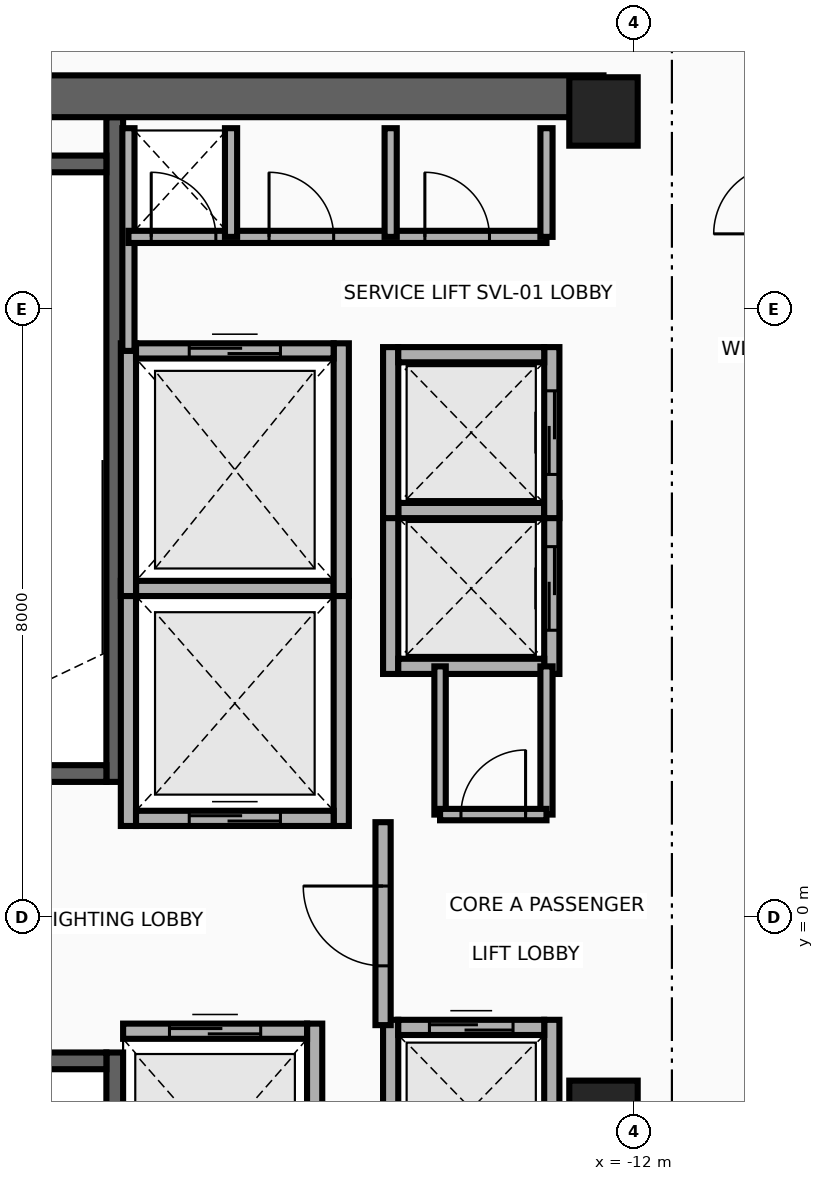
"""IFC4 building model, lengths in metres.
Left out: names, types, materials, properties, quantities, classifications, styles, units other than length and angle.
Written with IfcOpenShell. Run it as: python <this file> out.ifc"""

import sys

from ifc_helpers import new_model, si_unit, direction, frame, frame_2d, origin, origin_2d, place, context, subcontext, project, spatial, rectangle, extrude, source, transform, mapped, element, fill, save


model = new_model("IFC4")
c1 = context("Model", 3, precision=1e-05, world=origin(), true_north=direction((0.0, 1.0)))
c2 = subcontext(c1, "Body", "Model", "MODEL_VIEW")
j1 = project(units=[si_unit("LENGTHUNIT", "METRE"), si_unit("PLANEANGLEUNIT", "RADIAN")], contexts=[c1])
p1 = place(None, origin())
s1 = spatial("IfcSite", under=j1, at=p1, CompositionType="ELEMENT")
p2 = place(p1, origin())
s2 = spatial("IfcBuilding", under=s1, at=p2, CompositionType="ELEMENT")
p3 = place(p2, frame((0.0, 0.0, 237.0)))
s3 = spatial("IfcBuildingStorey", under=s2, at=p3, CompositionType="ELEMENT", Elevation=237.0)
p4 = place(p3, frame((-18.83, 1.78, 0.0), z_axis=(0.0, 0.0, 1.0), x_axis=(0.0, 1.0, 0.0)))
e1 = element("IfcWall", 1, at=p4, inside=s3, PredefinedType="SHEAR", context=c2, shape_type="SweptSolid", body=[
    extrude(rectangle(XDim=8.745, YDim=0.22, at=frame_2d((4.373, 0.0))), origin(), (0.0, 0.0, 1.0), 3.26),
])
p5 = place(p3, frame((-22.05, 1.89, 0.0), z_axis=(0.0, 0.0, 1.0), x_axis=(1.0, 0.0, 0.0)))
e2 = element("IfcWall", 2, at=p5, inside=s3, PredefinedType="SHEAR", context=c2, shape_type="SweptSolid", body=[
    extrude(rectangle(XDim=3.11, YDim=0.22, at=frame_2d((1.555, 0.0))), origin(), (0.0, 0.0, 1.0), 3.26),
])
p6 = place(p5, frame((1.0, 0.0, 0.0)))
e3 = element("IfcOpeningElement", 3, at=p6, cuts=e2, PredefinedType="OPENING", context=c2, shape_type="SweptSolid", body=[
    extrude(rectangle(XDim=1.1, YDim=2.15, at=frame_2d((0.55, 1.075))), frame((0.0, 0.125, 0.0), z_axis=(0.0, -1.0, 0.0), x_axis=(1.0, 0.0, 0.0)), (0.0, 0.0, 1.0), 0.25),
])
p7 = place(p3, frame((-22.05, 9.91, 0.0), z_axis=(0.0, 0.0, 1.0), x_axis=(1.0, 0.0, 0.0)))
e4 = element("IfcWall", 4, at=p7, inside=s3, PredefinedType="SHEAR", context=c2, shape_type="SweptSolid", body=[
    extrude(rectangle(XDim=3.11, YDim=0.22, at=frame_2d((1.555, 0.0))), origin(), (0.0, 0.0, 1.0), 3.26),
])
p8 = place(p3, frame((-18.83, -10.525, 0.0), z_axis=(0.0, 0.0, 1.0), x_axis=(0.0, 1.0, 0.0)))
e5 = element("IfcWall", 5, at=p8, inside=s3, PredefinedType="SHEAR", context=c2, shape_type="SweptSolid", body=[
    extrude(rectangle(XDim=8.745, YDim=0.22, at=frame_2d((4.373, 0.0))), origin(), (0.0, 0.0, 1.0), 3.26),
])
p9 = place(p3, frame((-22.05, -1.89, 0.0), z_axis=(0.0, 0.0, 1.0), x_axis=(1.0, 0.0, 0.0)))
e6 = element("IfcWall", 6, at=p9, inside=s3, PredefinedType="SHEAR", context=c2, shape_type="SweptSolid", body=[
    extrude(rectangle(XDim=3.11, YDim=0.22, at=frame_2d((1.555, 0.0))), origin(), (0.0, 0.0, 1.0), 3.26),
])
p10 = place(p9, frame((1.0, 0.0, 0.0)))
e7 = element("IfcOpeningElement", 7, at=p10, cuts=e6, PredefinedType="OPENING", context=c2, shape_type="SweptSolid", body=[
    extrude(rectangle(XDim=1.1, YDim=2.15, at=frame_2d((0.55, 1.075))), frame((0.0, 0.125, 0.0), z_axis=(0.0, -1.0, 0.0), x_axis=(1.0, 0.0, 0.0)), (0.0, 0.0, 1.0), 0.25),
])
p11 = place(p3, frame((-22.65, 10.8, 0.0), z_axis=(0.0, 0.0, 1.0), x_axis=(1.0, 0.0, 0.0)))
e8 = element("IfcWall", 8, at=p11, inside=s3, PredefinedType="SHEAR", context=c2, shape_type="SweptSolid", body=[
    extrude(rectangle(XDim=10.25, YDim=0.55, at=frame_2d((5.125, 0.0))), origin(), (0.0, 0.0, 1.0), 3.26),
])
m1 = source(origin(), c2, "Body", "SweptSolid", [
    extrude(rectangle(XDim=0.9, YDim=0.9, at=origin_2d()), origin(), (0.0, 0.0, 1.0), 3.5),
])
for number, where, z_axis, x_axis in (
    (9, (-12.4, -2.6, 0.0), (0.0, 0.0, 1.0), (1.0, 0.0, 0.0)),
    (10, (-12.4, 10.6, 0.0), (0.0, 0.0, 1.0), (1.0, 0.0, 0.0)),
):
    element("IfcColumn", number, at=place(p3, frame(where, z_axis=z_axis, x_axis=x_axis)), inside=s3, PredefinedType="COLUMN", context=c2, shape_type="MappedRepresentation", body=[
        mapped(m1, transform((0.0, 0.0, 0.0), x_axis=(1.0, 0.0, 0.0), y_axis=(0.0, 1.0, 0.0), z_axis=(0.0, 0.0, 1.0), scale=1.0)),
    ])
for number, where, z_axis, x_axis in (
    (11, (-18.65, 1.2, 0.0), (0.0, 0.0, 1.0), (0.0, 1.0, 0.0)),
    (12, (-15.85, 1.2, 0.0), (0.0, 0.0, 1.0), (0.0, 1.0, 0.0)),
):
    element("IfcWall", number, at=place(p3, frame(where, z_axis=z_axis, x_axis=x_axis)), inside=s3, PredefinedType="MOVABLE", context=c2, shape_type="SweptSolid", body=[
        extrude(rectangle(XDim=3.225, YDim=0.2, at=frame_2d((1.613, 0.0))), origin(), (0.0, 0.0, 1.0), 3.26),
    ])
p12 = place(p3, frame((-18.55, 1.3, 0.0), z_axis=(0.0, 0.0, 1.0), x_axis=(1.0, 0.0, 0.0)))
e13 = element("IfcWall", 13, at=p12, inside=s3, PredefinedType="MOVABLE", context=c2, shape_type="SweptSolid", body=[
    extrude(rectangle(XDim=2.6, YDim=0.2, at=frame_2d((1.3, 0.0))), origin(), (0.0, 0.0, 1.0), 3.26),
])
p13 = place(p12, frame((0.7, 0.0, 0.0)))
e14 = element("IfcOpeningElement", 14, at=p13, cuts=e13, PredefinedType="OPENING", context=c2, shape_type="SweptSolid", body=[
    extrude(rectangle(XDim=1.2, YDim=2.1, at=frame_2d((0.6, 1.05))), frame((0.0, 0.115, 0.0), z_axis=(0.0, -1.0, 0.0), x_axis=(1.0, 0.0, 0.0)), (0.0, 0.0, 1.0), 0.23),
])
p14 = place(p3, frame((-18.55, 4.325, 0.0), z_axis=(0.0, 0.0, 1.0), x_axis=(1.0, 0.0, 0.0)))
e15 = element("IfcWall", 15, at=p14, inside=s3, PredefinedType="MOVABLE", context=c2, shape_type="SweptSolid", body=[
    extrude(rectangle(XDim=2.6, YDim=0.2, at=frame_2d((1.3, 0.0))), origin(), (0.0, 0.0, 1.0), 3.26),
])
p15 = place(p3, frame((-16.2, -4.6, 0.0), z_axis=(0.0, 0.0, 1.0), x_axis=(0.0, 1.0, 0.0)))
e16 = element("IfcWall", 16, at=p15, inside=s3, PredefinedType="MOVABLE", context=c2, shape_type="SweptSolid", body=[
    extrude(rectangle(XDim=3.2, YDim=0.2, at=frame_2d((1.6, 0.0))), origin(), (0.0, 0.0, 1.0), 3.26),
])
p16 = place(p3, frame((-18.72, -1.5, 0.0), z_axis=(0.0, 0.0, 1.0), x_axis=(1.0, 0.0, 0.0)))
e17 = element("IfcWall", 17, at=p16, inside=s3, PredefinedType="MOVABLE", context=c2, shape_type="SweptSolid", body=[
    extrude(rectangle(XDim=2.42, YDim=0.2, at=frame_2d((1.21, 0.0))), origin(), (0.0, 0.0, 1.0), 3.26),
])
p17 = place(p16, frame((0.61, 0.0, 0.0)))
e18 = element("IfcOpeningElement", 18, at=p17, cuts=e17, PredefinedType="OPENING", context=c2, shape_type="SweptSolid", body=[
    extrude(rectangle(XDim=1.2, YDim=2.1, at=frame_2d((0.6, 1.05))), frame((0.0, 0.115, 0.0), z_axis=(0.0, -1.0, 0.0), x_axis=(1.0, 0.0, 0.0)), (0.0, 0.0, 1.0), 0.23),
])
for number, where, z_axis, x_axis in (
    (19, (-18.65, 4.225, 0.0), (0.0, 0.0, 1.0), (0.0, 1.0, 0.0)),
    (20, (-15.85, 4.225, 0.0), (0.0, 0.0, 1.0), (0.0, 1.0, 0.0)),
):
    element("IfcWall", number, at=place(p3, frame(where, z_axis=z_axis, x_axis=x_axis)), inside=s3, PredefinedType="MOVABLE", context=c2, shape_type="SweptSolid", body=[
        extrude(rectangle(XDim=3.325, YDim=0.2, at=frame_2d((1.663, 0.0))), origin(), (0.0, 0.0, 1.0), 3.26),
    ])
p18 = place(p3, frame((-18.55, 7.45, 0.0), z_axis=(0.0, 0.0, 1.0), x_axis=(1.0, 0.0, 0.0)))
e21 = element("IfcWall", 21, at=p18, inside=s3, PredefinedType="MOVABLE", context=c2, shape_type="SweptSolid", body=[
    extrude(rectangle(XDim=2.6, YDim=0.2, at=frame_2d((1.3, 0.0))), origin(), (0.0, 0.0, 1.0), 3.26),
])
p19 = place(p18, frame((0.7, 0.0, 0.0)))
e22 = element("IfcOpeningElement", 22, at=p19, cuts=e21, PredefinedType="OPENING", context=c2, shape_type="SweptSolid", body=[
    extrude(rectangle(XDim=1.2, YDim=2.1, at=frame_2d((0.6, 1.05))), frame((0.0, 0.115, 0.0), z_axis=(0.0, -1.0, 0.0), x_axis=(1.0, 0.0, 0.0)), (0.0, 0.0, 1.0), 0.23),
])
p20 = place(p3, frame((-15.2, 3.2, 0.0), z_axis=(0.0, 0.0, 1.0), x_axis=(0.0, 1.0, 0.0)))
e23 = element("IfcWall", 23, at=p20, inside=s3, PredefinedType="MOVABLE", context=c2, shape_type="SweptSolid", body=[
    extrude(rectangle(XDim=2.25, YDim=0.2, at=frame_2d((1.125, 0.0))), origin(), (0.0, 0.0, 1.0), 3.26),
])
p21 = place(p3, frame((-13.08, 3.2, 0.0), z_axis=(0.0, 0.0, 1.0), x_axis=(0.0, 1.0, 0.0)))
e24 = element("IfcWall", 24, at=p21, inside=s3, PredefinedType="MOVABLE", context=c2, shape_type="SweptSolid", body=[
    extrude(rectangle(XDim=2.25, YDim=0.2, at=frame_2d((1.125, 0.0))), origin(), (0.0, 0.0, 1.0), 3.26),
])
p22 = place(p21, frame((0.575, 0.0, 0.0)))
e25 = element("IfcOpeningElement", 25, at=p22, cuts=e24, PredefinedType="OPENING", context=c2, shape_type="SweptSolid", body=[
    extrude(rectangle(XDim=1.1, YDim=2.1, at=frame_2d((0.55, 1.05))), frame((0.0, 0.115, 0.0), z_axis=(0.0, -1.0, 0.0), x_axis=(1.0, 0.0, 0.0)), (0.0, 0.0, 1.0), 0.23),
])
for number, where, z_axis, x_axis in (
    (26, (-15.1, 3.3, 0.0), (0.0, 0.0, 1.0), (1.0, 0.0, 0.0)),
    (27, (-15.1, 5.35, 0.0), (0.0, 0.0, 1.0), (1.0, 0.0, 0.0)),
):
    element("IfcWall", number, at=place(p3, frame(where, z_axis=z_axis, x_axis=x_axis)), inside=s3, PredefinedType="MOVABLE", context=c2, shape_type="SweptSolid", body=[
        extrude(rectangle(XDim=1.92, YDim=0.2, at=frame_2d((0.96, 0.0))), origin(), (0.0, 0.0, 1.0), 3.26),
    ])
p23 = place(p3, frame((-15.2, 5.25, 0.0), z_axis=(0.0, 0.0, 1.0), x_axis=(0.0, 1.0, 0.0)))
e28 = element("IfcWall", 28, at=p23, inside=s3, PredefinedType="MOVABLE", context=c2, shape_type="SweptSolid", body=[
    extrude(rectangle(XDim=2.25, YDim=0.2, at=frame_2d((1.125, 0.0))), origin(), (0.0, 0.0, 1.0), 3.26),
])
p24 = place(p3, frame((-13.08, 5.25, 0.0), z_axis=(0.0, 0.0, 1.0), x_axis=(0.0, 1.0, 0.0)))
e29 = element("IfcWall", 29, at=p24, inside=s3, PredefinedType="MOVABLE", context=c2, shape_type="SweptSolid", body=[
    extrude(rectangle(XDim=2.25, YDim=0.2, at=frame_2d((1.125, 0.0))), origin(), (0.0, 0.0, 1.0), 3.26),
])
p25 = place(p24, frame((0.575, 0.0, 0.0)))
e30 = element("IfcOpeningElement", 30, at=p25, cuts=e29, PredefinedType="OPENING", context=c2, shape_type="SweptSolid", body=[
    extrude(rectangle(XDim=1.1, YDim=2.1, at=frame_2d((0.55, 1.05))), frame((0.0, 0.115, 0.0), z_axis=(0.0, -1.0, 0.0), x_axis=(1.0, 0.0, 0.0)), (0.0, 0.0, 1.0), 0.23),
])
p26 = place(p3, frame((-15.1, 7.4, 0.0), z_axis=(0.0, 0.0, 1.0), x_axis=(1.0, 0.0, 0.0)))
e31 = element("IfcWall", 31, at=p26, inside=s3, PredefinedType="MOVABLE", context=c2, shape_type="SweptSolid", body=[
    extrude(rectangle(XDim=1.92, YDim=0.2, at=frame_2d((0.96, 0.0))), origin(), (0.0, 0.0, 1.0), 3.26),
])
for number, where, z_axis, x_axis in (
    (32, (-15.2, -3.7, 0.0), (0.0, 0.0, 1.0), (0.0, 1.0, 0.0)),
    (33, (-13.08, -3.7, 0.0), (0.0, 0.0, 1.0), (0.0, 1.0, 0.0)),
):
    element("IfcWall", number, at=place(p3, frame(where, z_axis=z_axis, x_axis=x_axis)), inside=s3, PredefinedType="MOVABLE", context=c2, shape_type="SweptSolid", body=[
        extrude(rectangle(XDim=2.35, YDim=0.2, at=frame_2d((1.175, 0.0))), origin(), (0.0, 0.0, 1.0), 3.26),
    ])
p27 = place(p3, frame((-15.1, -1.45, 0.0), z_axis=(0.0, 0.0, 1.0), x_axis=(1.0, 0.0, 0.0)))
e34 = element("IfcWall", 34, at=p27, inside=s3, PredefinedType="MOVABLE", context=c2, shape_type="SweptSolid", body=[
    extrude(rectangle(XDim=1.92, YDim=0.2, at=frame_2d((0.96, 0.0))), origin(), (0.0, 0.0, 1.0), 3.26),
])
p28 = place(p27, frame((0.41, 0.0, 0.0)))
e35 = element("IfcOpeningElement", 35, at=p28, cuts=e34, PredefinedType="OPENING", context=c2, shape_type="SweptSolid", body=[
    extrude(rectangle(XDim=1.1, YDim=2.1, at=frame_2d((0.55, 1.05))), frame((0.0, 0.115, 0.0), z_axis=(0.0, -1.0, 0.0), x_axis=(1.0, 0.0, 0.0)), (0.0, 0.0, 1.0), 0.23),
])
p29 = place(p3, frame((-15.3, -1.42, 0.0), z_axis=(0.0, 0.0, 1.0), x_axis=(0.0, 1.0, 0.0)))
e36 = element("IfcWall", 36, at=p29, inside=s3, PredefinedType="PARTITIONING", context=c2, shape_type="SweptSolid", body=[
    extrude(rectangle(XDim=2.67, YDim=0.2, at=frame_2d((1.335, 0.0))), origin(), (0.0, 0.0, 1.0), 3.26),
])
p30 = place(p29, frame((0.78, 0.0, 0.0)))
e37 = element("IfcOpeningElement", 37, at=p30, cuts=e36, PredefinedType="OPENING", context=c2, shape_type="SweptSolid", body=[
    extrude(rectangle(XDim=1.05, YDim=2.15, at=frame_2d((0.525, 1.075))), frame((0.0, 0.115, 0.0), z_axis=(0.0, -1.0, 0.0), x_axis=(1.0, 0.0, 0.0)), (0.0, 0.0, 1.0), 0.23),
])
p31 = place(p3, frame((-18.65, 7.45, 0.0), z_axis=(0.0, 0.0, 1.0), x_axis=(0.0, 1.0, 0.0)))
e38 = element("IfcWall", 38, at=p31, inside=s3, PredefinedType="PARTITIONING", context=c2, shape_type="SweptSolid", body=[
    extrude(rectangle(XDim=2.93, YDim=0.16, at=frame_2d((1.465, 0.0))), origin(), (0.0, 0.0, 1.0), 3.26),
])
p32 = place(p3, frame((-18.65, 8.95, 0.0), z_axis=(0.0, 0.0, 1.0), x_axis=(1.0, 0.0, 0.0)))
e39 = element("IfcWall", 39, at=p32, inside=s3, PredefinedType="PARTITIONING", context=c2, shape_type="SweptSolid", body=[
    extrude(rectangle(XDim=5.5, YDim=0.16, at=frame_2d((2.75, 0.0))), origin(), (0.0, 0.0, 1.0), 3.26),
])
p33 = place(p32, frame((0.3, 0.0, 0.0)))
e40 = element("IfcOpeningElement", 40, at=p33, cuts=e39, PredefinedType="OPENING", context=c2, shape_type="SweptSolid", body=[
    extrude(rectangle(XDim=0.85, YDim=2.05, at=frame_2d((0.425, 1.025))), frame((0.0, 0.095, 0.0), z_axis=(0.0, -1.0, 0.0), x_axis=(1.0, 0.0, 0.0)), (0.0, 0.0, 1.0), 0.19),
])
p34 = place(p32, frame((1.85, 0.0, 0.0)))
e41 = element("IfcOpeningElement", 41, at=p34, cuts=e39, PredefinedType="OPENING", context=c2, shape_type="SweptSolid", body=[
    extrude(rectangle(XDim=0.85, YDim=2.05, at=frame_2d((0.425, 1.025))), frame((0.0, 0.095, 0.0), z_axis=(0.0, -1.0, 0.0), x_axis=(1.0, 0.0, 0.0)), (0.0, 0.0, 1.0), 0.19),
])
p35 = place(p32, frame((3.9, 0.0, 0.0)))
e42 = element("IfcOpeningElement", 42, at=p35, cuts=e39, PredefinedType="OPENING", context=c2, shape_type="SweptSolid", body=[
    extrude(rectangle(XDim=0.85, YDim=2.05, at=frame_2d((0.425, 1.025))), frame((0.0, 0.095, 0.0), z_axis=(0.0, -1.0, 0.0), x_axis=(1.0, 0.0, 0.0)), (0.0, 0.0, 1.0), 0.19),
])
for number, where, z_axis, x_axis in (
    (43, (-13.15, 8.95, 0.0), (0.0, 0.0, 1.0), (0.0, 1.0, 0.0)),
    (44, (-17.3, 8.95, 0.0), (0.0, 0.0, 1.0), (0.0, 1.0, 0.0)),
    (45, (-15.2, 8.95, 0.0), (0.0, 0.0, 1.0), (0.0, 1.0, 0.0)),
):
    element("IfcWall", number, at=place(p3, frame(where, z_axis=z_axis, x_axis=x_axis)), inside=s3, PredefinedType="PARTITIONING", context=c2, shape_type="SweptSolid", body=[
        extrude(rectangle(XDim=1.43, YDim=0.16, at=frame_2d((0.715, 0.0))), origin(), (0.0, 0.0, 1.0), 3.26),
    ])
p36 = place(p3, frame((-13.15, 1.35, 0.0), z_axis=(0.0, 0.0, 1.0), x_axis=(0.0, 1.0, 0.0)))
e46 = element("IfcWall", 46, at=p36, inside=s3, PredefinedType="PARTITIONING", context=c2, shape_type="SweptSolid", body=[
    extrude(rectangle(XDim=1.95, YDim=0.16, at=frame_2d((0.975, 0.0))), origin(), (0.0, 0.0, 1.0), 3.26),
])
p37 = place(p3, frame((-14.55, 1.35, 0.0), z_axis=(0.0, 0.0, 1.0), x_axis=(0.0, 1.0, 0.0)))
e47 = element("IfcWall", 47, at=p37, inside=s3, PredefinedType="PARTITIONING", context=c2, shape_type="SweptSolid", body=[
    extrude(rectangle(XDim=1.95, YDim=0.15, at=frame_2d((0.975, 0.0))), origin(), (0.0, 0.0, 1.0), 3.26),
])
p38 = place(p3, frame((-14.55, 1.35, 0.0), z_axis=(0.0, 0.0, 1.0), x_axis=(1.0, 0.0, 0.0)))
e48 = element("IfcWall", 48, at=p38, inside=s3, PredefinedType="PARTITIONING", context=c2, shape_type="SweptSolid", body=[
    extrude(rectangle(XDim=1.4, YDim=0.15, at=frame_2d((0.7, 0.0))), origin(), (0.0, 0.0, 1.0), 3.26),
])
p39 = place(p38, frame((0.275, 0.0, 0.0)))
e49 = element("IfcOpeningElement", 49, at=p39, cuts=e48, PredefinedType="OPENING", context=c2, shape_type="SweptSolid", body=[
    extrude(rectangle(XDim=0.85, YDim=2.05, at=frame_2d((0.425, 1.025))), frame((0.0, 0.09, 0.0), z_axis=(0.0, -1.0, 0.0), x_axis=(1.0, 0.0, 0.0)), (0.0, 0.0, 1.0), 0.18),
])
p40 = place(p13, origin())
e50 = element("IfcDoor", 50, at=p40, inside=s3, OperationType="DOUBLE_DOOR_SLIDING", PredefinedType="DOOR", context=c2, shape_type="SweptSolid", body=[
    extrude(rectangle(XDim=1.2, YDim=2.1, at=frame_2d((0.6, 1.05))), frame((0.0, 0.025, 0.0), z_axis=(0.0, -1.0, 0.0), x_axis=(1.0, 0.0, 0.0)), (0.0, 0.0, 1.0), 0.05),
])
fill(e14, e50)
p41 = place(p17, origin())
e51 = element("IfcDoor", 51, at=p41, inside=s3, OperationType="DOUBLE_DOOR_SLIDING", PredefinedType="DOOR", context=c2, shape_type="SweptSolid", body=[
    extrude(rectangle(XDim=1.2, YDim=2.1, at=frame_2d((0.6, 1.05))), frame((0.0, 0.025, 0.0), z_axis=(0.0, -1.0, 0.0), x_axis=(1.0, 0.0, 0.0)), (0.0, 0.0, 1.0), 0.05),
])
fill(e18, e51)
p42 = place(p19, origin())
e52 = element("IfcDoor", 52, at=p42, inside=s3, OperationType="DOUBLE_DOOR_SLIDING", PredefinedType="DOOR", context=c2, shape_type="SweptSolid", body=[
    extrude(rectangle(XDim=1.2, YDim=2.1, at=frame_2d((0.6, 1.05))), frame((0.0, 0.025, 0.0), z_axis=(0.0, -1.0, 0.0), x_axis=(1.0, 0.0, 0.0)), (0.0, 0.0, 1.0), 0.05),
])
fill(e22, e52)
p43 = place(p22, origin())
e53 = element("IfcDoor", 53, at=p43, inside=s3, OperationType="DOUBLE_DOOR_SLIDING", PredefinedType="DOOR", context=c2, shape_type="SweptSolid", body=[
    extrude(rectangle(XDim=1.1, YDim=2.1, at=frame_2d((0.55, 1.05))), frame((0.0, 0.025, 0.0), z_axis=(0.0, -1.0, 0.0), x_axis=(1.0, 0.0, 0.0)), (0.0, 0.0, 1.0), 0.05),
])
fill(e25, e53)
p44 = place(p25, origin())
e54 = element("IfcDoor", 54, at=p44, inside=s3, OperationType="DOUBLE_DOOR_SLIDING", PredefinedType="DOOR", context=c2, shape_type="SweptSolid", body=[
    extrude(rectangle(XDim=1.1, YDim=2.1, at=frame_2d((0.55, 1.05))), frame((0.0, 0.025, 0.0), z_axis=(0.0, -1.0, 0.0), x_axis=(1.0, 0.0, 0.0)), (0.0, 0.0, 1.0), 0.05),
])
fill(e30, e54)
p45 = place(p28, origin())
e55 = element("IfcDoor", 55, at=p45, inside=s3, OperationType="DOUBLE_DOOR_SLIDING", PredefinedType="DOOR", context=c2, shape_type="SweptSolid", body=[
    extrude(rectangle(XDim=1.1, YDim=2.1, at=frame_2d((0.55, 1.05))), frame((0.0, 0.025, 0.0), z_axis=(0.0, -1.0, 0.0), x_axis=(1.0, 0.0, 0.0)), (0.0, 0.0, 1.0), 0.05),
])
fill(e35, e55)
p46 = place(p30, origin())
e56 = element("IfcDoor", 56, at=p46, inside=s3, OperationType="SINGLE_SWING_RIGHT", PredefinedType="DOOR", context=c2, shape_type="SweptSolid", body=[
    extrude(rectangle(XDim=1.05, YDim=2.15, at=frame_2d((0.525, 1.075))), frame((0.0, 0.025, 0.0), z_axis=(0.0, -1.0, 0.0), x_axis=(1.0, 0.0, 0.0)), (0.0, 0.0, 1.0), 0.05),
])
fill(e37, e56)
p47 = place(p33, origin())
e57 = element("IfcDoor", 57, at=p47, inside=s3, OperationType="SINGLE_SWING_LEFT", PredefinedType="DOOR", context=c2, shape_type="SweptSolid", body=[
    extrude(rectangle(XDim=0.85, YDim=2.05, at=frame_2d((0.425, 1.025))), frame((0.0, 0.025, 0.0), z_axis=(0.0, -1.0, 0.0), x_axis=(1.0, 0.0, 0.0)), (0.0, 0.0, 1.0), 0.05),
])
fill(e40, e57)
p48 = place(p34, origin())
e58 = element("IfcDoor", 58, at=p48, inside=s3, OperationType="SINGLE_SWING_RIGHT", PredefinedType="DOOR", context=c2, shape_type="SweptSolid", body=[
    extrude(rectangle(XDim=0.85, YDim=2.05, at=frame_2d((0.425, 1.025))), frame((0.0, 0.025, 0.0), z_axis=(0.0, -1.0, 0.0), x_axis=(1.0, 0.0, 0.0)), (0.0, 0.0, 1.0), 0.05),
])
fill(e41, e58)
p49 = place(p35, origin())
e59 = element("IfcDoor", 59, at=p49, inside=s3, OperationType="SINGLE_SWING_LEFT", PredefinedType="DOOR", context=c2, shape_type="SweptSolid", body=[
    extrude(rectangle(XDim=0.85, YDim=2.05, at=frame_2d((0.425, 1.025))), frame((0.0, 0.025, 0.0), z_axis=(0.0, -1.0, 0.0), x_axis=(1.0, 0.0, 0.0)), (0.0, 0.0, 1.0), 0.05),
])
fill(e42, e59)
p50 = place(p39, origin())
e60 = element("IfcDoor", 60, at=p50, inside=s3, OperationType="SINGLE_SWING_LEFT", PredefinedType="DOOR", context=c2, shape_type="SweptSolid", body=[
    extrude(rectangle(XDim=0.85, YDim=2.05, at=frame_2d((0.425, 1.025))), frame((0.0, 0.025, 0.0), z_axis=(0.0, -1.0, 0.0), x_axis=(1.0, 0.0, 0.0)), (0.0, 0.0, 1.0), 0.05),
])
fill(e49, e60)
save(model, sys.argv[1])
